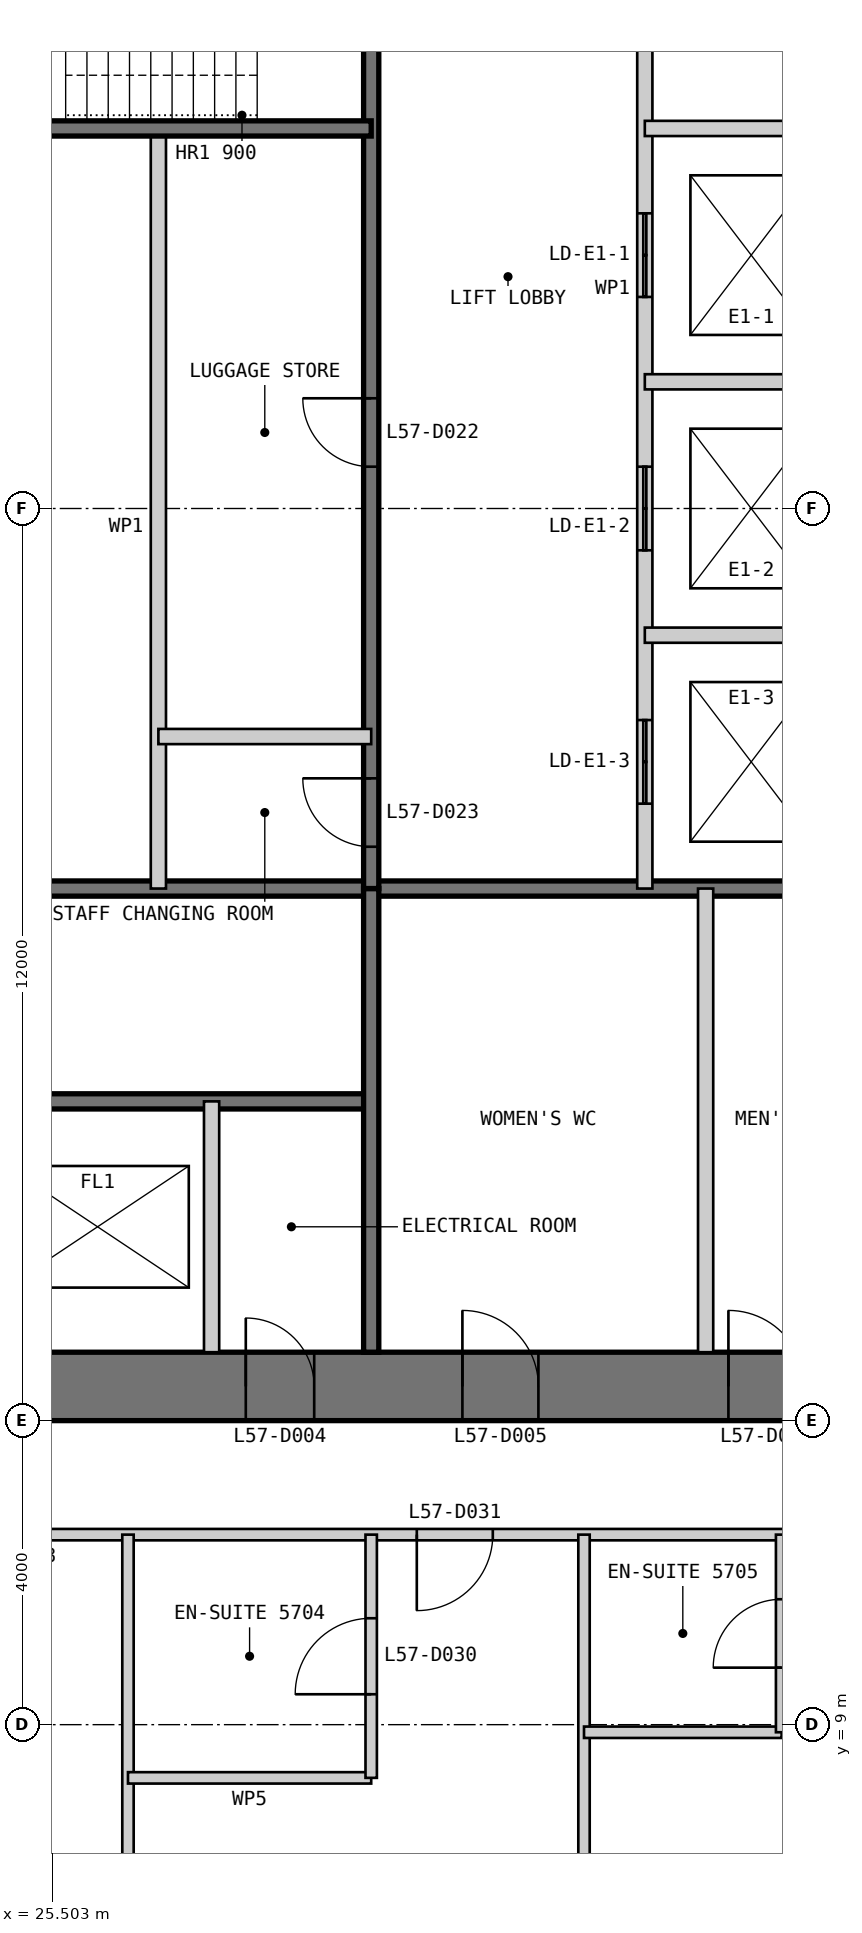
"""IFC4 building model, lengths in metres.
Left out: names, types, materials, properties, quantities, classifications, styles, units other than length and angle.
Written with IfcOpenShell. Run it as: python <this file> out.ifc"""

import sys

from ifc_helpers import new_model, si_unit, direction, frame, frame_2d, origin, place, context, subcontext, project, spatial, polyline, rectangle, outline, extrude, element, fill, save


model = new_model("IFC4")
c1 = context("Model", 3, precision=1e-05, world=origin(), true_north=direction((0.0, 1.0)))
c2 = subcontext(c1, "Body", "Model", "MODEL_VIEW")
j1 = project(units=[si_unit("LENGTHUNIT", "METRE"), si_unit("PLANEANGLEUNIT", "RADIAN")], contexts=[c1])
p1 = place(None, origin())
s1 = spatial("IfcSite", under=j1, at=p1, CompositionType="ELEMENT")
p2 = place(p1, origin())
s2 = spatial("IfcBuilding", under=s1, at=p2, CompositionType="ELEMENT")
p3 = place(p2, frame((0.0, 0.0, 245.8)))
s3 = spatial("IfcBuildingStorey", under=s2, at=p3, CompositionType="ELEMENT", Elevation=245.8)
p4 = place(p3, frame((13.0, 13.45, 0.0), z_axis=(0.0, 0.0, 1.0), x_axis=(1.0, 0.0, 0.0)))
e1 = element("IfcWall", 1, at=p4, inside=s3, PredefinedType="SHEAR", context=c2, shape_type="SweptSolid", body=[
    extrude(outline(polyline([(0.0, -0.45), (24.0, -0.45), (23.1, 0.45), (0.9, 0.45), (0.0, -0.45)])), origin(), (0.0, 0.0, 1.0), 3.4),
])
p5 = place(p4, frame((4.9, 0.0, 0.0)))
e2 = element("IfcOpeningElement", 2, at=p5, cuts=e1, PredefinedType="OPENING", context=c2, shape_type="SweptSolid", body=[
    extrude(rectangle(XDim=1.0, YDim=2.2, at=frame_2d((0.5, 1.1))), frame((0.0, 0.46, 0.0), z_axis=(0.0, -1.0, 0.0), x_axis=(1.0, 0.0, 0.0)), (0.0, 0.0, 1.0), 0.92),
])
p6 = place(p4, frame((8.9, 0.0, 0.0)))
e3 = element("IfcOpeningElement", 3, at=p6, cuts=e1, PredefinedType="OPENING", context=c2, shape_type="SweptSolid", body=[
    extrude(rectangle(XDim=1.1, YDim=2.2, at=frame_2d((0.55, 1.1))), frame((0.0, 0.46, 0.0), z_axis=(0.0, -1.0, 0.0), x_axis=(1.0, 0.0, 0.0)), (0.0, 0.0, 1.0), 0.92),
])
p7 = place(p4, frame((15.05, 0.0, 0.0)))
e4 = element("IfcOpeningElement", 4, at=p7, cuts=e1, PredefinedType="OPENING", context=c2, shape_type="SweptSolid", body=[
    extrude(rectangle(XDim=0.9, YDim=2.2, at=frame_2d((0.45, 1.1))), frame((0.0, 0.46, 0.0), z_axis=(0.0, -1.0, 0.0), x_axis=(1.0, 0.0, 0.0)), (0.0, 0.0, 1.0), 0.92),
])
p8 = place(p4, frame((17.9, 0.0, 0.0)))
e5 = element("IfcOpeningElement", 5, at=p8, cuts=e1, PredefinedType="OPENING", context=c2, shape_type="SweptSolid", body=[
    extrude(rectangle(XDim=1.0, YDim=2.2, at=frame_2d((0.5, 1.1))), frame((0.0, 0.46, 0.0), z_axis=(0.0, -1.0, 0.0), x_axis=(1.0, 0.0, 0.0)), (0.0, 0.0, 1.0), 0.92),
])
p9 = place(p4, frame((21.4, 0.0, 0.0)))
e6 = element("IfcOpeningElement", 6, at=p9, cuts=e1, PredefinedType="OPENING", context=c2, shape_type="SweptSolid", body=[
    extrude(rectangle(XDim=1.0, YDim=2.2, at=frame_2d((0.5, 1.1))), frame((0.0, 0.46, 0.0), z_axis=(0.0, -1.0, 0.0), x_axis=(1.0, 0.0, 0.0)), (0.0, 0.0, 1.0), 0.92),
])
p10 = place(p3, frame((20.3, 17.2, 0.0), z_axis=(0.0, 0.0, 1.0), x_axis=(1.0, 0.0, 0.0)))
e7 = element("IfcWall", 7, at=p10, inside=s3, PredefinedType="SOLIDWALL", context=c2, shape_type="SweptSolid", body=[
    extrude(rectangle(XDim=9.4, YDim=0.2, at=frame_2d((4.7, 0.0))), origin(), (0.0, 0.0, 1.0), 3.2),
])
p11 = place(p10, frame((0.25, 0.0, 0.0)))
e8 = element("IfcOpeningElement", 8, at=p11, cuts=e7, PredefinedType="OPENING", context=c2, shape_type="SweptSolid", body=[
    extrude(rectangle(XDim=1.0, YDim=2.2, at=frame_2d((0.5, 1.1))), frame((0.0, 0.11, 0.0), z_axis=(0.0, -1.0, 0.0), x_axis=(1.0, 0.0, 0.0)), (0.0, 0.0, 1.0), 0.22),
])
p12 = place(p3, frame((20.3, 20.0, 0.0), z_axis=(0.0, 0.0, 1.0), x_axis=(1.0, 0.0, 0.0)))
e9 = element("IfcWall", 9, at=p12, inside=s3, PredefinedType="SOLIDWALL", context=c2, shape_type="SweptSolid", body=[
    extrude(rectangle(XDim=15.8, YDim=0.2, at=frame_2d((7.9, 0.0))), origin(), (0.0, 0.0, 1.0), 3.2),
])
p13 = place(p3, frame((27.6, 13.9, 0.0), z_axis=(0.0, 0.0, 1.0), x_axis=(0.0, 1.0, 0.0)))
e10 = element("IfcWall", 10, at=p13, inside=s3, PredefinedType="PARTITIONING", context=c2, shape_type="SweptSolid", body=[
    extrude(rectangle(XDim=3.3, YDim=0.2, at=frame_2d((1.65, 0.0))), origin(), (0.0, 0.0, 1.0), 3.2),
])
p14 = place(p3, frame((29.7, 13.9, 0.0), z_axis=(0.0, 0.0, 1.0), x_axis=(0.0, 1.0, 0.0)))
e11 = element("IfcWall", 11, at=p14, inside=s3, PredefinedType="SOLIDWALL", context=c2, shape_type="SweptSolid", body=[
    extrude(rectangle(XDim=6.1, YDim=0.2, at=frame_2d((3.05, 0.0))), origin(), (0.0, 0.0, 1.0), 3.2),
])
p15 = place(p3, frame((34.1, 13.9, 0.0), z_axis=(0.0, 0.0, 1.0), x_axis=(0.0, 1.0, 0.0)))
e12 = element("IfcWall", 12, at=p15, inside=s3, PredefinedType="PARTITIONING", context=c2, shape_type="SweptSolid", body=[
    extrude(rectangle(XDim=6.1, YDim=0.2, at=frame_2d((3.05, 0.0))), origin(), (0.0, 0.0, 1.0), 3.2),
])
p16 = place(p3, frame((33.3, 36.1, 0.0), z_axis=(0.0, 0.0, 1.0), x_axis=(0.0, -1.0, 0.0)))
e13 = element("IfcWall", 13, at=p16, inside=s3, PredefinedType="PARTITIONING", context=c2, shape_type="SweptSolid", body=[
    extrude(rectangle(XDim=16.1, YDim=0.2, at=frame_2d((8.05, 0.0))), origin(), (0.0, 0.0, 1.0), 3.2),
])
p17 = place(p16, frame((7.217, 0.0, 0.0)))
e14 = element("IfcOpeningElement", 14, at=p17, cuts=e13, PredefinedType="OPENING", context=c2, shape_type="SweptSolid", body=[
    extrude(rectangle(XDim=1.1, YDim=2.2, at=frame_2d((0.55, 1.1))), frame((0.0, 0.11, 0.0), z_axis=(0.0, -1.0, 0.0), x_axis=(1.0, 0.0, 0.0)), (0.0, 0.0, 1.0), 0.22),
])
p18 = place(p16, frame((10.55, 0.0, 0.0)))
e15 = element("IfcOpeningElement", 15, at=p18, cuts=e13, PredefinedType="OPENING", context=c2, shape_type="SweptSolid", body=[
    extrude(rectangle(XDim=1.1, YDim=2.2, at=frame_2d((0.55, 1.1))), frame((0.0, 0.11, 0.0), z_axis=(0.0, -1.0, 0.0), x_axis=(1.0, 0.0, 0.0)), (0.0, 0.0, 1.0), 0.22),
])
p19 = place(p16, frame((13.883, 0.0, 0.0)))
e16 = element("IfcOpeningElement", 16, at=p19, cuts=e13, PredefinedType="OPENING", context=c2, shape_type="SweptSolid", body=[
    extrude(rectangle(XDim=1.1, YDim=2.2, at=frame_2d((0.55, 1.1))), frame((0.0, 0.11, 0.0), z_axis=(0.0, -1.0, 0.0), x_axis=(1.0, 0.0, 0.0)), (0.0, 0.0, 1.0), 0.22),
])
p20 = place(p3, frame((29.7, 36.1, 0.0), z_axis=(0.0, 0.0, 1.0), x_axis=(0.0, -1.0, 0.0)))
e17 = element("IfcWall", 17, at=p20, inside=s3, PredefinedType="SOLIDWALL", context=c2, shape_type="SweptSolid", body=[
    extrude(rectangle(XDim=16.1, YDim=0.2, at=frame_2d((8.05, 0.0))), origin(), (0.0, 0.0, 1.0), 3.2),
])
p21 = place(p20, frame((9.65, 0.0, 0.0)))
e18 = element("IfcOpeningElement", 18, at=p21, cuts=e17, PredefinedType="OPENING", context=c2, shape_type="SweptSolid", body=[
    extrude(rectangle(XDim=0.9, YDim=2.2, at=frame_2d((0.45, 1.1))), frame((0.0, 0.11, 0.0), z_axis=(0.0, -1.0, 0.0), x_axis=(1.0, 0.0, 0.0)), (0.0, 0.0, 1.0), 0.22),
])
p22 = place(p20, frame((14.65, 0.0, 0.0)))
e19 = element("IfcOpeningElement", 19, at=p22, cuts=e17, PredefinedType="OPENING", context=c2, shape_type="SweptSolid", body=[
    extrude(rectangle(XDim=0.9, YDim=2.2, at=frame_2d((0.45, 1.1))), frame((0.0, 0.11, 0.0), z_axis=(0.0, -1.0, 0.0), x_axis=(1.0, 0.0, 0.0)), (0.0, 0.0, 1.0), 0.22),
])
for number, where, z_axis, x_axis in (
    (20, (36.1, 30.0, 0.0), (0.0, 0.0, 1.0), (-1.0, 0.0, 0.0)),
    (21, (36.1, 26.667, 0.0), (0.0, 0.0, 1.0), (-1.0, 0.0, 0.0)),
    (22, (36.1, 23.333, 0.0), (0.0, 0.0, 1.0), (-1.0, 0.0, 0.0)),
):
    element("IfcWall", number, at=place(p3, frame(where, z_axis=z_axis, x_axis=x_axis)), inside=s3, PredefinedType="PARTITIONING", context=c2, shape_type="SweptSolid", body=[
        extrude(rectangle(XDim=2.8, YDim=0.2, at=frame_2d((1.4, 0.0))), origin(), (0.0, 0.0, 1.0), 3.2),
    ])
p23 = place(p3, frame((26.9, 30.0, 0.0), z_axis=(0.0, 0.0, 1.0), x_axis=(0.0, -1.0, 0.0)))
e23 = element("IfcWall", 23, at=p23, inside=s3, PredefinedType="PARTITIONING", context=c2, shape_type="SweptSolid", body=[
    extrude(rectangle(XDim=10.0, YDim=0.2, at=frame_2d((5.0, 0.0))), origin(), (0.0, 0.0, 1.0), 3.2),
])
p24 = place(p3, frame((29.7, 30.0, 0.0), z_axis=(0.0, 0.0, 1.0), x_axis=(-1.0, 0.0, 0.0)))
e24 = element("IfcWall", 24, at=p24, inside=s3, PredefinedType="SOLIDWALL", context=c2, shape_type="SweptSolid", body=[
    extrude(rectangle(XDim=15.8, YDim=0.2, at=frame_2d((7.9, 0.0))), origin(), (0.0, 0.0, 1.0), 3.2),
])
p25 = place(p3, frame((29.7, 22.0, 0.0), z_axis=(0.0, 0.0, 1.0), x_axis=(-1.0, 0.0, 0.0)))
e25 = element("IfcWall", 25, at=p25, inside=s3, PredefinedType="PARTITIONING", context=c2, shape_type="SweptSolid", body=[
    extrude(rectangle(XDim=2.8, YDim=0.2, at=frame_2d((1.4, 0.0))), origin(), (0.0, 0.0, 1.0), 3.2),
])
p26 = place(p3, frame((11.5, 11.5, 0.0), z_axis=(0.0, 0.0, 1.0), x_axis=(1.0, 0.0, 0.0)))
e26 = element("IfcWall", 26, at=p26, inside=s3, PredefinedType="PARTITIONING", context=c2, shape_type="SweptSolid", body=[
    extrude(rectangle(XDim=27.0, YDim=0.15, at=frame_2d((13.5, 0.0))), origin(), (0.0, 0.0, 1.0), 3.25),
])
p27 = place(p26, frame((1.85, 0.0, 0.0)))
e27 = element("IfcOpeningElement", 27, at=p27, cuts=e26, PredefinedType="OPENING", context=c2, shape_type="SweptSolid", body=[
    extrude(rectangle(XDim=0.9, YDim=2.1, at=frame_2d((0.45, 1.05))), frame((0.0, 0.085, 0.0), z_axis=(0.0, -1.0, 0.0), x_axis=(1.0, 0.0, 0.0)), (0.0, 0.0, 1.0), 0.17),
])
p28 = place(p26, frame((6.2, 0.0, 0.0)))
e28 = element("IfcOpeningElement", 28, at=p28, cuts=e26, PredefinedType="OPENING", context=c2, shape_type="SweptSolid", body=[
    extrude(rectangle(XDim=0.9, YDim=2.1, at=frame_2d((0.45, 1.05))), frame((0.0, 0.085, 0.0), z_axis=(0.0, -1.0, 0.0), x_axis=(1.0, 0.0, 0.0)), (0.0, 0.0, 1.0), 0.17),
])
p29 = place(p26, frame((12.2, 0.0, 0.0)))
e29 = element("IfcOpeningElement", 29, at=p29, cuts=e26, PredefinedType="OPENING", context=c2, shape_type="SweptSolid", body=[
    extrude(rectangle(XDim=0.9, YDim=2.1, at=frame_2d((0.45, 1.05))), frame((0.0, 0.085, 0.0), z_axis=(0.0, -1.0, 0.0), x_axis=(1.0, 0.0, 0.0)), (0.0, 0.0, 1.0), 0.17),
])
p30 = place(p26, frame((18.8, 0.0, 0.0)))
e30 = element("IfcOpeningElement", 30, at=p30, cuts=e26, PredefinedType="OPENING", context=c2, shape_type="SweptSolid", body=[
    extrude(rectangle(XDim=1.0, YDim=2.1, at=frame_2d((0.5, 1.05))), frame((0.0, 0.085, 0.0), z_axis=(0.0, -1.0, 0.0), x_axis=(1.0, 0.0, 0.0)), (0.0, 0.0, 1.0), 0.17),
])
p31 = place(p26, frame((24.2, 0.0, 0.0)))
e31 = element("IfcOpeningElement", 31, at=p31, cuts=e26, PredefinedType="OPENING", context=c2, shape_type="SweptSolid", body=[
    extrude(rectangle(XDim=0.9, YDim=2.1, at=frame_2d((0.45, 1.05))), frame((0.0, 0.085, 0.0), z_axis=(0.0, -1.0, 0.0), x_axis=(1.0, 0.0, 0.0)), (0.0, 0.0, 1.0), 0.17),
])
p32 = place(p3, frame((26.5, 0.15, 0.0), z_axis=(0.0, 0.0, 1.0), x_axis=(0.0, 1.0, 0.0)))
e32 = element("IfcWall", 32, at=p32, inside=s3, PredefinedType="PARTITIONING", context=c2, shape_type="SweptSolid", body=[
    extrude(rectangle(XDim=11.35, YDim=0.15, at=frame_2d((5.675, 0.0))), origin(), (0.0, 0.0, 1.0), 3.25),
])
p33 = place(p3, frame((26.5, 8.3, 0.0), z_axis=(0.0, 0.0, 1.0), x_axis=(1.0, 0.0, 0.0)))
e33 = element("IfcWall", 33, at=p33, inside=s3, PredefinedType="PARTITIONING", context=c2, shape_type="SweptSolid", body=[
    extrude(rectangle(XDim=3.2, YDim=0.15, at=frame_2d((1.6, 0.0))), origin(), (0.0, 0.0, 1.0), 3.25),
])
p34 = place(p3, frame((29.7, 8.3, 0.0), z_axis=(0.0, 0.0, 1.0), x_axis=(0.0, 1.0, 0.0)))
e34 = element("IfcWall", 34, at=p34, inside=s3, PredefinedType="PARTITIONING", context=c2, shape_type="SweptSolid", body=[
    extrude(rectangle(XDim=3.2, YDim=0.15, at=frame_2d((1.6, 0.0))), origin(), (0.0, 0.0, 1.0), 3.25),
])
p35 = place(p34, frame((1.1, 0.0, 0.0)))
e35 = element("IfcOpeningElement", 35, at=p35, cuts=e34, PredefinedType="OPENING", context=c2, shape_type="SweptSolid", body=[
    extrude(rectangle(XDim=1.0, YDim=2.1, at=frame_2d((0.5, 1.05))), frame((0.0, 0.085, 0.0), z_axis=(0.0, -1.0, 0.0), x_axis=(1.0, 0.0, 0.0)), (0.0, 0.0, 1.0), 0.17),
])
p36 = place(p3, frame((32.5, 0.15, 0.0), z_axis=(0.0, 0.0, 1.0), x_axis=(0.0, 1.0, 0.0)))
e36 = element("IfcWall", 36, at=p36, inside=s3, PredefinedType="PARTITIONING", context=c2, shape_type="SweptSolid", body=[
    extrude(rectangle(XDim=11.35, YDim=0.15, at=frame_2d((5.675, 0.0))), origin(), (0.0, 0.0, 1.0), 3.25),
])
p37 = place(p3, frame((32.5, 8.9, 0.0), z_axis=(0.0, 0.0, 1.0), x_axis=(1.0, 0.0, 0.0)))
e37 = element("IfcWall", 37, at=p37, inside=s3, PredefinedType="PARTITIONING", context=c2, shape_type="SweptSolid", body=[
    extrude(rectangle(XDim=2.6, YDim=0.15, at=frame_2d((1.3, 0.0))), origin(), (0.0, 0.0, 1.0), 3.25),
])
p38 = place(p3, frame((35.1, 8.9, 0.0), z_axis=(0.0, 0.0, 1.0), x_axis=(0.0, 1.0, 0.0)))
e38 = element("IfcWall", 38, at=p38, inside=s3, PredefinedType="PARTITIONING", context=c2, shape_type="SweptSolid", body=[
    extrude(rectangle(XDim=2.6, YDim=0.15, at=frame_2d((1.3, 0.0))), origin(), (0.0, 0.0, 1.0), 3.25),
])
p39 = place(p38, frame((0.85, 0.0, 0.0)))
e39 = element("IfcOpeningElement", 39, at=p39, cuts=e38, PredefinedType="OPENING", context=c2, shape_type="SweptSolid", body=[
    extrude(rectangle(XDim=0.9, YDim=2.1, at=frame_2d((0.45, 1.05))), frame((0.0, 0.085, 0.0), z_axis=(0.0, -1.0, 0.0), x_axis=(1.0, 0.0, 0.0)), (0.0, 0.0, 1.0), 0.17),
])
p40 = place(p7, origin())
e40 = element("IfcDoor", 40, at=p40, inside=s3, OperationType="SINGLE_SWING_LEFT", PredefinedType="DOOR", context=c2, shape_type="SweptSolid", body=[
    extrude(rectangle(XDim=0.9, YDim=2.2, at=frame_2d((0.45, 1.1))), frame((0.0, 0.025, 0.0), z_axis=(0.0, -1.0, 0.0), x_axis=(1.0, 0.0, 0.0)), (0.0, 0.0, 1.0), 0.05),
    extrude(outline(polyline([(0.0, 0.0), (0.04, 0.0), (0.04, 2.16), (0.86, 2.16), (0.86, 0.0), (0.9, 0.0), (0.9, 2.2), (0.0, 2.2), (0.0, 0.0)])), frame((0.0, 0.3, 0.0), z_axis=(0.0, -1.0, 0.0), x_axis=(1.0, 0.0, 0.0)), (0.0, 0.0, 1.0), 0.6),
])
fill(e4, e40)
p41 = place(p8, origin())
e41 = element("IfcDoor", 41, at=p41, inside=s3, OperationType="SINGLE_SWING_LEFT", PredefinedType="DOOR", context=c2, shape_type="SweptSolid", body=[
    extrude(rectangle(XDim=1.0, YDim=2.2, at=frame_2d((0.5, 1.1))), frame((0.0, 0.025, 0.0), z_axis=(0.0, -1.0, 0.0), x_axis=(1.0, 0.0, 0.0)), (0.0, 0.0, 1.0), 0.05),
    extrude(outline(polyline([(0.0, 0.0), (0.04, 0.0), (0.04, 2.16), (0.96, 2.16), (0.96, 0.0), (1.0, 0.0), (1.0, 2.2), (0.0, 2.2), (0.0, 0.0)])), frame((0.0, 0.3, 0.0), z_axis=(0.0, -1.0, 0.0), x_axis=(1.0, 0.0, 0.0)), (0.0, 0.0, 1.0), 0.6),
])
fill(e5, e41)
p42 = place(p9, origin())
e42 = element("IfcDoor", 42, at=p42, inside=s3, OperationType="SINGLE_SWING_LEFT", PredefinedType="DOOR", context=c2, shape_type="SweptSolid", body=[
    extrude(rectangle(XDim=1.0, YDim=2.2, at=frame_2d((0.5, 1.1))), frame((0.0, 0.025, 0.0), z_axis=(0.0, -1.0, 0.0), x_axis=(1.0, 0.0, 0.0)), (0.0, 0.0, 1.0), 0.05),
    extrude(outline(polyline([(0.0, 0.0), (0.04, 0.0), (0.04, 2.16), (0.96, 2.16), (0.96, 0.0), (1.0, 0.0), (1.0, 2.2), (0.0, 2.2), (0.0, 0.0)])), frame((0.0, 0.3, 0.0), z_axis=(0.0, -1.0, 0.0), x_axis=(1.0, 0.0, 0.0)), (0.0, 0.0, 1.0), 0.6),
])
fill(e6, e42)
p43 = place(p21, frame((0.9, 0.0, 0.0), z_axis=(0.0, 0.0, 1.0), x_axis=(-1.0, 0.0, 0.0)))
e43 = element("IfcDoor", 43, at=p43, inside=s3, OperationType="SINGLE_SWING_RIGHT", PredefinedType="DOOR", context=c2, shape_type="SweptSolid", body=[
    extrude(rectangle(XDim=0.9, YDim=2.2, at=frame_2d((0.45, 1.1))), frame((0.0, 0.025, 0.0), z_axis=(0.0, -1.0, 0.0), x_axis=(1.0, 0.0, 0.0)), (0.0, 0.0, 1.0), 0.05),
])
fill(e18, e43)
p44 = place(p22, frame((0.9, 0.0, 0.0), z_axis=(0.0, 0.0, 1.0), x_axis=(-1.0, 0.0, 0.0)))
e44 = element("IfcDoor", 44, at=p44, inside=s3, OperationType="SINGLE_SWING_RIGHT", PredefinedType="DOOR", context=c2, shape_type="SweptSolid", body=[
    extrude(rectangle(XDim=0.9, YDim=2.2, at=frame_2d((0.45, 1.1))), frame((0.0, 0.025, 0.0), z_axis=(0.0, -1.0, 0.0), x_axis=(1.0, 0.0, 0.0)), (0.0, 0.0, 1.0), 0.05),
])
fill(e19, e44)
p45 = place(p35, origin())
e45 = element("IfcDoor", 45, at=p45, inside=s3, OperationType="SINGLE_SWING_LEFT", PredefinedType="DOOR", context=c2, shape_type="SweptSolid", body=[
    extrude(rectangle(XDim=1.0, YDim=2.1, at=frame_2d((0.5, 1.05))), frame((0.0, 0.025, 0.0), z_axis=(0.0, -1.0, 0.0), x_axis=(1.0, 0.0, 0.0)), (0.0, 0.0, 1.0), 0.05),
])
fill(e35, e45)
p46 = place(p30, frame((1.0, 0.0, 0.0), z_axis=(0.0, 0.0, 1.0), x_axis=(-1.0, 0.0, 0.0)))
e46 = element("IfcDoor", 46, at=p46, inside=s3, OperationType="SINGLE_SWING_RIGHT", PredefinedType="DOOR", context=c2, shape_type="SweptSolid", body=[
    extrude(rectangle(XDim=1.0, YDim=2.1, at=frame_2d((0.5, 1.05))), frame((0.0, 0.025, 0.0), z_axis=(0.0, -1.0, 0.0), x_axis=(1.0, 0.0, 0.0)), (0.0, 0.0, 1.0), 0.05),
])
fill(e30, e46)
p47 = place(p39, origin())
e47 = element("IfcDoor", 47, at=p47, inside=s3, OperationType="SINGLE_SWING_LEFT", PredefinedType="DOOR", context=c2, shape_type="SweptSolid", body=[
    extrude(rectangle(XDim=0.9, YDim=2.1, at=frame_2d((0.45, 1.05))), frame((0.0, 0.025, 0.0), z_axis=(0.0, -1.0, 0.0), x_axis=(1.0, 0.0, 0.0)), (0.0, 0.0, 1.0), 0.05),
])
fill(e39, e47)
p48 = place(p17, origin())
e48 = element("IfcDoor", 48, at=p48, inside=s3, OperationType="DOUBLE_DOOR_SLIDING", PredefinedType="DOOR", context=c2, shape_type="SweptSolid", body=[
    extrude(rectangle(XDim=1.1, YDim=2.2, at=frame_2d((0.55, 1.1))), frame((0.0, 0.025, 0.0), z_axis=(0.0, -1.0, 0.0), x_axis=(1.0, 0.0, 0.0)), (0.0, 0.0, 1.0), 0.05),
])
fill(e14, e48)
p49 = place(p18, origin())
e49 = element("IfcDoor", 49, at=p49, inside=s3, OperationType="DOUBLE_DOOR_SLIDING", PredefinedType="DOOR", context=c2, shape_type="SweptSolid", body=[
    extrude(rectangle(XDim=1.1, YDim=2.2, at=frame_2d((0.55, 1.1))), frame((0.0, 0.025, 0.0), z_axis=(0.0, -1.0, 0.0), x_axis=(1.0, 0.0, 0.0)), (0.0, 0.0, 1.0), 0.05),
])
fill(e15, e49)
p50 = place(p19, origin())
e50 = element("IfcDoor", 50, at=p50, inside=s3, OperationType="DOUBLE_DOOR_SLIDING", PredefinedType="DOOR", context=c2, shape_type="SweptSolid", body=[
    extrude(rectangle(XDim=1.1, YDim=2.2, at=frame_2d((0.55, 1.1))), frame((0.0, 0.025, 0.0), z_axis=(0.0, -1.0, 0.0), x_axis=(1.0, 0.0, 0.0)), (0.0, 0.0, 1.0), 0.05),
])
fill(e16, e50)
save(model, sys.argv[1])
